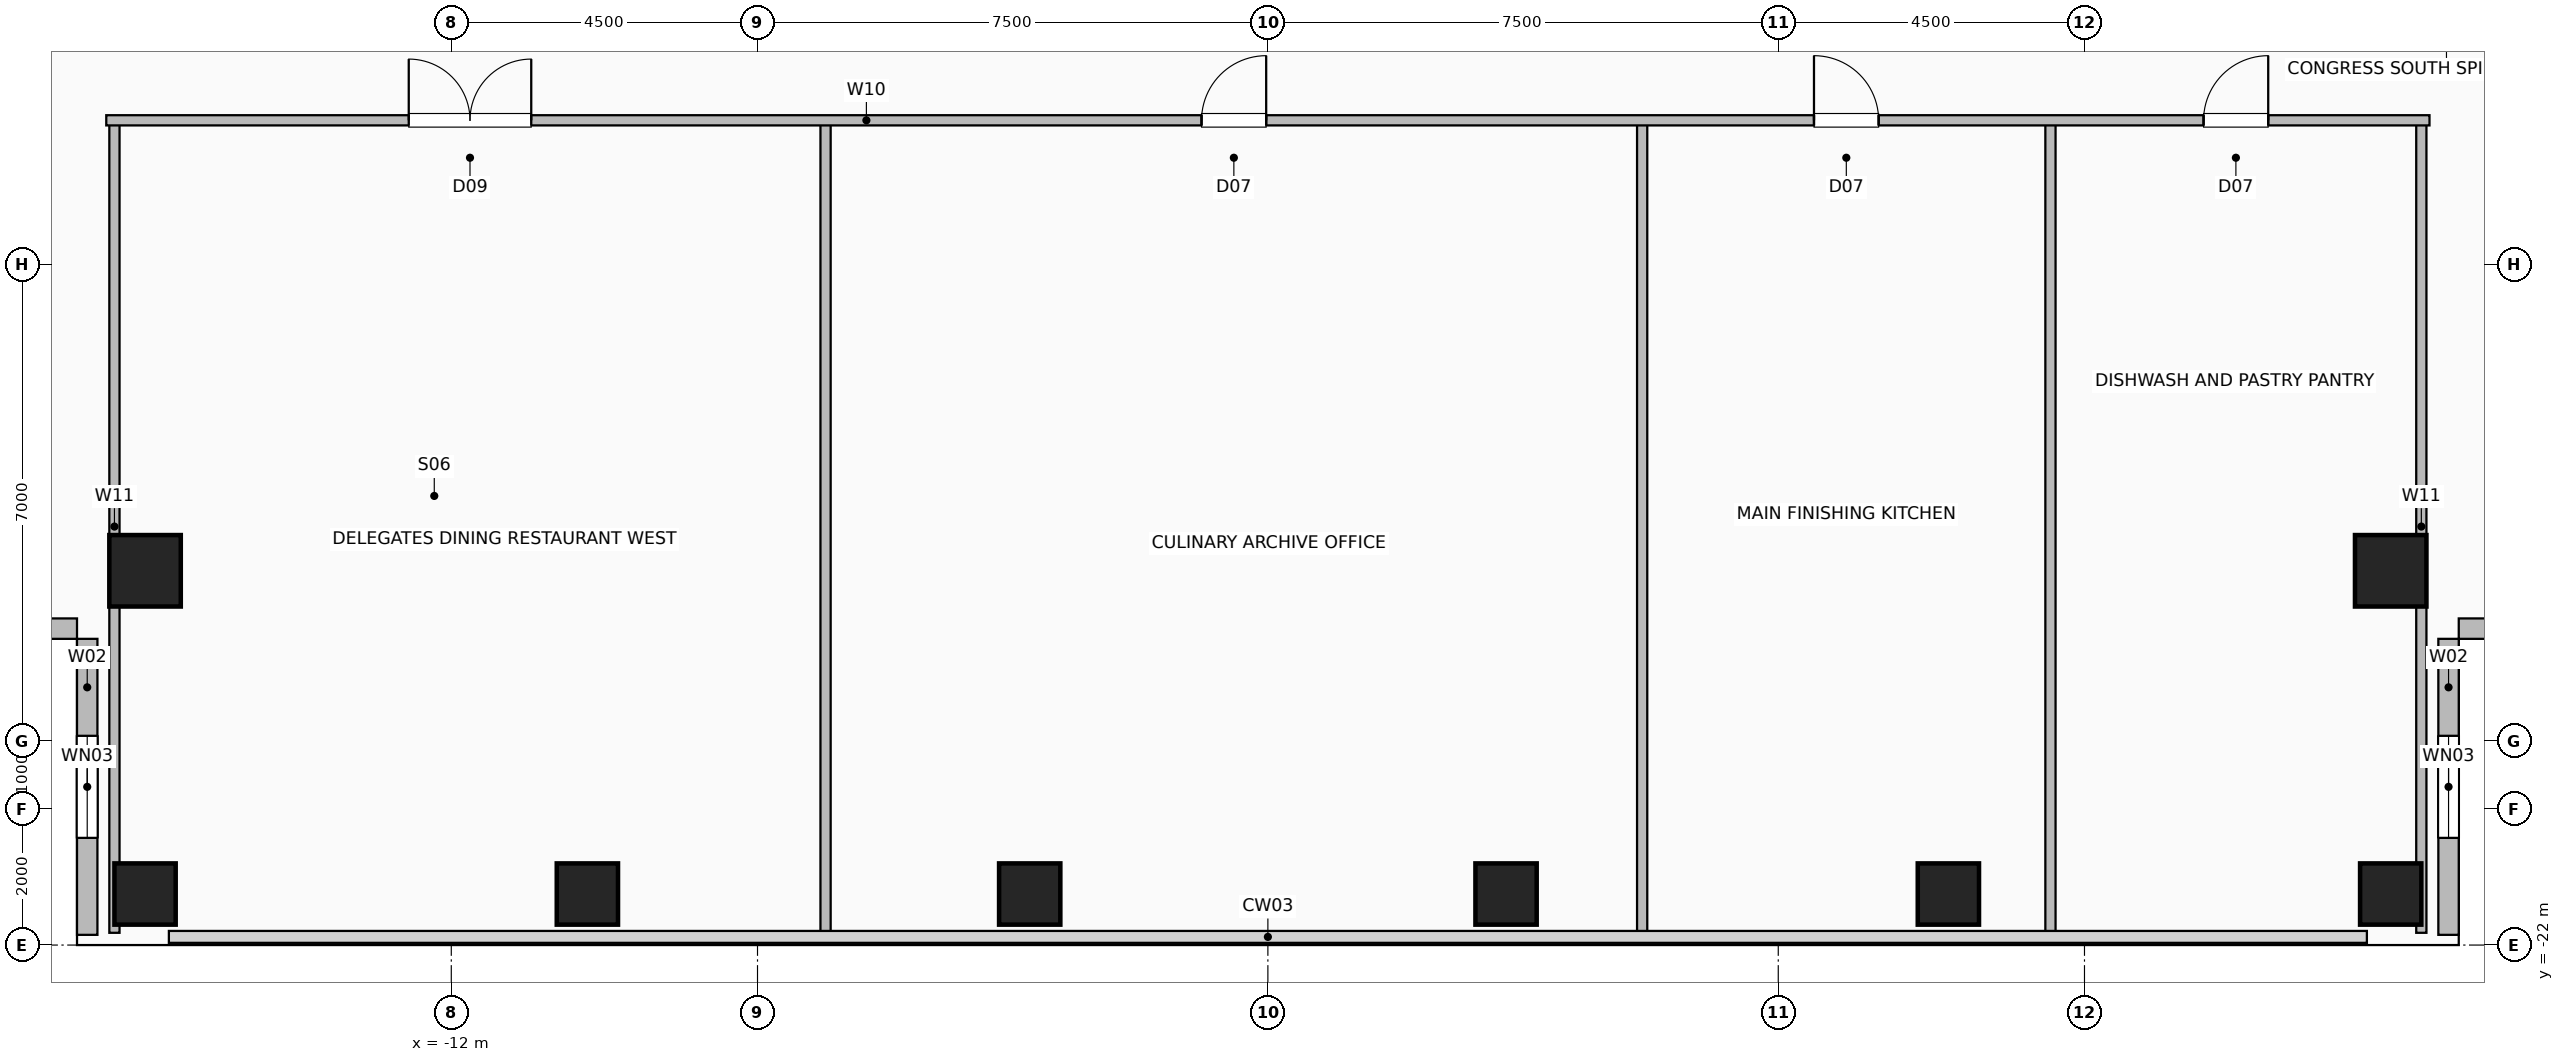
"""IFC4 building model, lengths in metres.
Left out: names, types, materials, properties, quantities, classifications, styles, units other than length and angle.
Written with IfcOpenShell. Run it as: python <this file> out.ifc"""

import sys

from ifc_helpers import new_model, si_unit, direction, frame, frame_2d, origin, origin_2d, place, context, subcontext, project, spatial, rectangle, hollow_rectangle, extrude, element, fill, save


model = new_model("IFC4")
c1 = context("Model", 3, precision=1e-05, world=origin(), true_north=direction((0.0, 1.0)))
c2 = subcontext(c1, "Body", "Model", "MODEL_VIEW")
j1 = project(units=[si_unit("LENGTHUNIT", "METRE"), si_unit("PLANEANGLEUNIT", "RADIAN")], contexts=[c1])
p1 = place(None, origin())
s1 = spatial("IfcSite", under=j1, at=p1, CompositionType="ELEMENT")
p2 = place(p1, origin())
s2 = spatial("IfcBuilding", under=s1, at=p2, CompositionType="ELEMENT")
p3 = place(p2, frame((0.0, 0.0, 119.2)))
s3 = spatial("IfcBuildingStorey", under=s2, at=p3, CompositionType="ELEMENT", Elevation=119.2)
for number, where, z_axis, x_axis in (
    (1, (-16.5, -21.25, 0.0), (0.0, 0.0, 1.0), (1.0, 0.0, 0.0)),
    (2, (-10.0, -21.25, 0.0), (0.0, 0.0, 1.0), (1.0, 0.0, 0.0)),
    (3, (-3.5, -21.25, 0.0), (0.0, 0.0, 1.0), (1.0, 0.0, 0.0)),
    (4, (3.5, -21.25, 0.0), (0.0, 0.0, 1.0), (1.0, 0.0, 0.0)),
    (5, (10.0, -21.25, 0.0), (0.0, 0.0, 1.0), (1.0, 0.0, 0.0)),
    (6, (16.5, -21.25, 0.0), (0.0, 0.0, 1.0), (1.0, 0.0, 0.0)),
):
    element("IfcColumn", number, at=place(p3, frame(where, z_axis=z_axis, x_axis=x_axis)), inside=s3, PredefinedType="COLUMN", context=c2, shape_type="SweptSolid", body=[
        extrude(hollow_rectangle(XDim=0.9, YDim=0.9, WallThickness=0.045, at=origin_2d()), origin(), (0.0, 0.0, 1.0), 3.6),
    ])
for number, where, z_axis, x_axis in (
    (7, (-16.5, -16.5, 0.0), (0.0, 0.0, 1.0), (1.0, 0.0, 0.0)),
    (8, (16.5, -16.5, 0.0), (0.0, 0.0, 1.0), (1.0, 0.0, 0.0)),
):
    element("IfcColumn", number, at=place(p3, frame(where, z_axis=z_axis, x_axis=x_axis)), inside=s3, PredefinedType="COLUMN", context=c2, shape_type="SweptSolid", body=[
        extrude(hollow_rectangle(XDim=1.05, YDim=1.05, WallThickness=0.05, at=origin_2d()), origin(), (0.0, 0.0, 1.0), 3.6),
    ])
p4 = place(p3, frame((-17.35, -21.85, 0.0), z_axis=(0.0, 0.0, 1.0), x_axis=(0.0, 1.0, 0.0)))
e9 = element("IfcWall", 9, at=p4, inside=s3, PredefinedType="SOLIDWALL", context=c2, shape_type="SweptSolid", body=[
    extrude(rectangle(XDim=4.35, YDim=0.3, at=frame_2d((2.175, 0.0))), origin(), (0.0, 0.0, 1.0), 3.36),
])
p5 = place(p4, frame((1.425, 0.0, 0.9)))
e10 = element("IfcOpeningElement", 10, at=p5, cuts=e9, PredefinedType="OPENING", context=c2, shape_type="SweptSolid", body=[
    extrude(rectangle(XDim=1.5, YDim=1.8, at=frame_2d((0.75, 0.9))), frame((0.0, 0.16, 0.0), z_axis=(0.0, -1.0, 0.0), x_axis=(1.0, 0.0, 0.0)), (0.0, 0.0, 1.0), 0.32),
])
p6 = place(p3, frame((-21.85, -17.35, 0.0), z_axis=(0.0, 0.0, 1.0), x_axis=(1.0, 0.0, 0.0)))
e11 = element("IfcWall", 11, at=p6, inside=s3, PredefinedType="SOLIDWALL", context=c2, shape_type="SweptSolid", body=[
    extrude(rectangle(XDim=4.35, YDim=0.3, at=frame_2d((2.175, 0.0))), origin(), (0.0, 0.0, 1.0), 3.36),
])
p7 = place(p3, frame((17.35, -21.85, 0.0), z_axis=(0.0, 0.0, 1.0), x_axis=(0.0, 1.0, 0.0)))
e12 = element("IfcWall", 12, at=p7, inside=s3, PredefinedType="SOLIDWALL", context=c2, shape_type="SweptSolid", body=[
    extrude(rectangle(XDim=4.35, YDim=0.3, at=frame_2d((2.175, 0.0))), origin(), (0.0, 0.0, 1.0), 3.36),
])
p8 = place(p7, frame((1.425, 0.0, 0.9)))
e13 = element("IfcOpeningElement", 13, at=p8, cuts=e12, PredefinedType="OPENING", context=c2, shape_type="SweptSolid", body=[
    extrude(rectangle(XDim=1.5, YDim=1.8, at=frame_2d((0.75, 0.9))), frame((0.0, 0.16, 0.0), z_axis=(0.0, -1.0, 0.0), x_axis=(1.0, 0.0, 0.0)), (0.0, 0.0, 1.0), 0.32),
])
p9 = place(p3, frame((21.85, -17.35, 0.0), z_axis=(0.0, 0.0, 1.0), x_axis=(-1.0, 0.0, 0.0)))
e14 = element("IfcWall", 14, at=p9, inside=s3, PredefinedType="SOLIDWALL", context=c2, shape_type="SweptSolid", body=[
    extrude(rectangle(XDim=4.35, YDim=0.3, at=frame_2d((2.175, 0.0))), origin(), (0.0, 0.0, 1.0), 3.36),
])
for number, where, z_axis, x_axis in (
    (15, (-16.95, -21.82, 0.0), (0.0, 0.0, 1.0), (0.0, 1.0, 0.0)),
    (16, (-6.5, -21.82, 0.0), (0.0, 0.0, 1.0), (0.0, 1.0, 0.0)),
    (17, (5.5, -21.82, 0.0), (0.0, 0.0, 1.0), (0.0, 1.0, 0.0)),
    (18, (11.5, -21.82, 0.0), (0.0, 0.0, 1.0), (0.0, 1.0, 0.0)),
    (19, (16.95, -21.82, 0.0), (0.0, 0.0, 1.0), (0.0, 1.0, 0.0)),
):
    element("IfcWall", number, at=place(p3, frame(where, z_axis=z_axis, x_axis=x_axis)), inside=s3, PredefinedType="PARTITIONING", context=c2, shape_type="SweptSolid", body=[
        extrude(rectangle(XDim=11.94, YDim=0.15, at=frame_2d((5.97, 0.0))), origin(), (0.0, 0.0, 1.0), 3.36),
    ])
p10 = place(p3, frame((-17.07, -9.88, 0.0), z_axis=(0.0, 0.0, 1.0), x_axis=(1.0, 0.0, 0.0)))
e20 = element("IfcWall", 20, at=p10, inside=s3, PredefinedType="PARTITIONING", context=c2, shape_type="SweptSolid", body=[
    extrude(rectangle(XDim=34.14, YDim=0.15, at=frame_2d((17.07, 0.0))), origin(), (0.0, 0.0, 1.0), 3.36),
])
p11 = place(p10, frame((4.445, 0.0, 0.0)))
e21 = element("IfcOpeningElement", 21, at=p11, cuts=e20, PredefinedType="OPENING", context=c2, shape_type="SweptSolid", body=[
    extrude(rectangle(XDim=1.8, YDim=2.08, at=frame_2d((0.9, 1.04))), frame((0.0, 0.085, 0.0), z_axis=(0.0, -1.0, 0.0), x_axis=(1.0, 0.0, 0.0)), (0.0, 0.0, 1.0), 0.17),
])
p12 = place(p10, frame((16.095, 0.0, 0.0)))
e22 = element("IfcOpeningElement", 22, at=p12, cuts=e20, PredefinedType="OPENING", context=c2, shape_type="SweptSolid", body=[
    extrude(rectangle(XDim=0.95, YDim=2.06, at=frame_2d((0.475, 1.03))), frame((0.0, 0.085, 0.0), z_axis=(0.0, -1.0, 0.0), x_axis=(1.0, 0.0, 0.0)), (0.0, 0.0, 1.0), 0.17),
])
p13 = place(p10, frame((25.095, 0.0, 0.0)))
e23 = element("IfcOpeningElement", 23, at=p13, cuts=e20, PredefinedType="OPENING", context=c2, shape_type="SweptSolid", body=[
    extrude(rectangle(XDim=0.95, YDim=2.06, at=frame_2d((0.475, 1.03))), frame((0.0, 0.085, 0.0), z_axis=(0.0, -1.0, 0.0), x_axis=(1.0, 0.0, 0.0)), (0.0, 0.0, 1.0), 0.17),
])
p14 = place(p10, frame((30.82, 0.0, 0.0)))
e24 = element("IfcOpeningElement", 24, at=p14, cuts=e20, PredefinedType="OPENING", context=c2, shape_type="SweptSolid", body=[
    extrude(rectangle(XDim=0.95, YDim=2.06, at=frame_2d((0.475, 1.03))), frame((0.0, 0.085, 0.0), z_axis=(0.0, -1.0, 0.0), x_axis=(1.0, 0.0, 0.0)), (0.0, 0.0, 1.0), 0.17),
])
p15 = place(p5, origin())
e25 = element("IfcWindow", 25, at=p15, inside=s3, PartitioningType="SINGLE_PANEL", PredefinedType="WINDOW", context=c2, shape_type="SweptSolid", body=[
    extrude(rectangle(XDim=1.5, YDim=1.8, at=frame_2d((0.75, 0.9))), frame((0.0, 0.03, 0.0), z_axis=(0.0, -1.0, 0.0), x_axis=(1.0, 0.0, 0.0)), (0.0, 0.0, 1.0), 0.06),
])
fill(e10, e25)
p16 = place(p8, origin())
e26 = element("IfcWindow", 26, at=p16, inside=s3, PartitioningType="SINGLE_PANEL", PredefinedType="WINDOW", context=c2, shape_type="SweptSolid", body=[
    extrude(rectangle(XDim=1.5, YDim=1.8, at=frame_2d((0.75, 0.9))), frame((0.0, 0.03, 0.0), z_axis=(0.0, -1.0, 0.0), x_axis=(1.0, 0.0, 0.0)), (0.0, 0.0, 1.0), 0.06),
])
fill(e13, e26)
p17 = place(p11, origin())
e27 = element("IfcDoor", 27, at=p17, inside=s3, OperationType="DOUBLE_DOOR_SINGLE_SWING", PredefinedType="DOOR", context=c2, shape_type="SweptSolid", body=[
    extrude(rectangle(XDim=1.8, YDim=2.08, at=frame_2d((0.9, 1.04))), frame((0.0, 0.025, 0.0), z_axis=(0.0, -1.0, 0.0), x_axis=(1.0, 0.0, 0.0)), (0.0, 0.0, 1.0), 0.05),
])
fill(e21, e27)
p18 = place(p12, origin())
e28 = element("IfcDoor", 28, at=p18, inside=s3, OperationType="SINGLE_SWING_RIGHT", PredefinedType="DOOR", context=c2, shape_type="SweptSolid", body=[
    extrude(rectangle(XDim=0.95, YDim=2.06, at=frame_2d((0.475, 1.03))), frame((0.0, 0.025, 0.0), z_axis=(0.0, -1.0, 0.0), x_axis=(1.0, 0.0, 0.0)), (0.0, 0.0, 1.0), 0.05),
])
fill(e22, e28)
p19 = place(p13, origin())
e29 = element("IfcDoor", 29, at=p19, inside=s3, OperationType="SINGLE_SWING_LEFT", PredefinedType="DOOR", context=c2, shape_type="SweptSolid", body=[
    extrude(rectangle(XDim=0.95, YDim=2.06, at=frame_2d((0.475, 1.03))), frame((0.0, 0.025, 0.0), z_axis=(0.0, -1.0, 0.0), x_axis=(1.0, 0.0, 0.0)), (0.0, 0.0, 1.0), 0.05),
])
fill(e23, e29)
p20 = place(p14, origin())
e30 = element("IfcDoor", 30, at=p20, inside=s3, OperationType="SINGLE_SWING_RIGHT", PredefinedType="DOOR", context=c2, shape_type="SweptSolid", body=[
    extrude(rectangle(XDim=0.95, YDim=2.06, at=frame_2d((0.475, 1.03))), frame((0.0, 0.025, 0.0), z_axis=(0.0, -1.0, 0.0), x_axis=(1.0, 0.0, 0.0)), (0.0, 0.0, 1.0), 0.05),
])
fill(e24, e30)
save(model, sys.argv[1])
